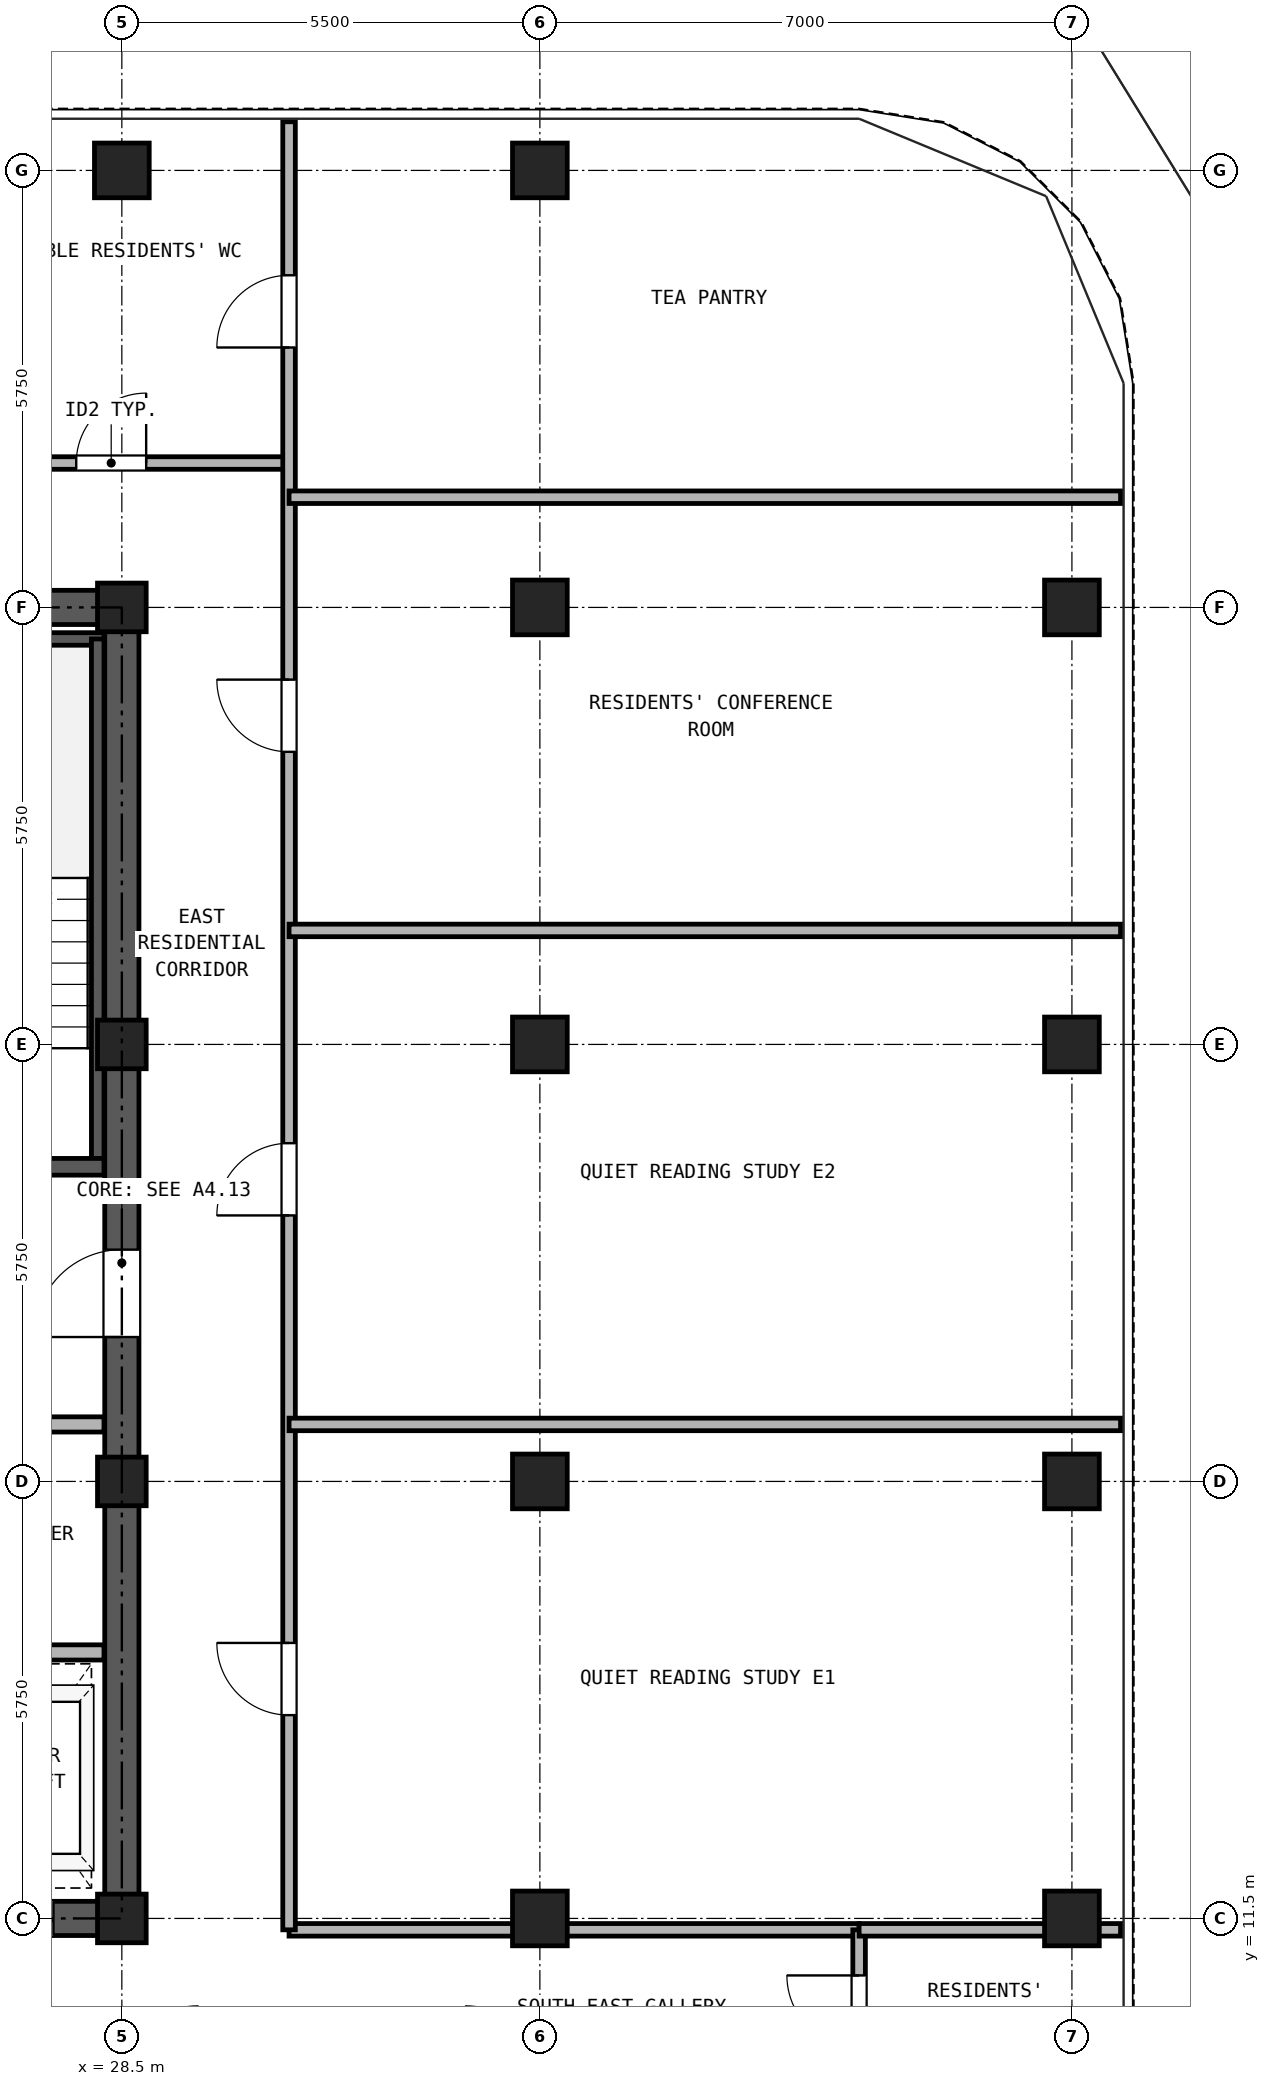
"""IFC4 building model, lengths in metres.
Left out: names, types, materials, properties, quantities, classifications, styles, units other than length and angle.
Written with IfcOpenShell. Run it as: python <this file> out.ifc"""

import sys

from ifc_helpers import new_model, si_unit, direction, frame, frame_2d, origin, origin_2d, place, context, subcontext, project, spatial, rectangle, hollow_rectangle, extrude, source, transform, mapped, element, fill, save


model = new_model("IFC4")
c1 = context("Model", 3, precision=1e-05, world=origin(), true_north=direction((0.0, 1.0)))
c2 = subcontext(c1, "Body", "Model", "MODEL_VIEW")
j1 = project(units=[si_unit("LENGTHUNIT", "METRE"), si_unit("PLANEANGLEUNIT", "RADIAN")], contexts=[c1])
p1 = place(None, origin())
s1 = spatial("IfcSite", under=j1, at=p1, CompositionType="ELEMENT")
p2 = place(p1, origin())
s2 = spatial("IfcBuilding", under=s1, at=p2, CompositionType="ELEMENT")
p3 = place(p2, frame((0.0, 0.0, 206.0)))
s3 = spatial("IfcBuildingStorey", under=s2, at=p3, CompositionType="ELEMENT", Elevation=206.0)
m1 = source(origin(), c2, "Body", "SweptSolid", [
    extrude(hollow_rectangle(XDim=0.72, YDim=0.72, WallThickness=0.04, at=origin_2d()), origin(), (0.0, 0.0, 1.0), 2.95),
])
for number, where, z_axis, x_axis in (
    (1, (28.5, 34.5, 0.0), (0.0, 0.0, 1.0), (1.0, 0.0, 0.0)),
    (2, (34.0, 34.5, 0.0), (0.0, 0.0, 1.0), (1.0, 0.0, 0.0)),
    (3, (41.0, 11.5, 0.0), (0.0, 0.0, 1.0), (1.0, 0.0, 0.0)),
    (4, (41.0, 17.25, 0.0), (0.0, 0.0, 1.0), (1.0, 0.0, 0.0)),
    (5, (41.0, 23.0, 0.0), (0.0, 0.0, 1.0), (1.0, 0.0, 0.0)),
    (6, (41.0, 28.75, 0.0), (0.0, 0.0, 1.0), (1.0, 0.0, 0.0)),
):
    element("IfcColumn", number, at=place(p3, frame(where, z_axis=z_axis, x_axis=x_axis)), inside=s3, PredefinedType="COLUMN", context=c2, shape_type="MappedRepresentation", body=[
        mapped(m1, transform((0.0, 0.0, 0.0), x_axis=(1.0, 0.0, 0.0), y_axis=(0.0, 1.0, 0.0), z_axis=(0.0, 0.0, 1.0), scale=1.0)),
    ])
m2 = source(origin(), c2, "Body", "SweptSolid", [
    extrude(hollow_rectangle(XDim=0.64, YDim=0.64, WallThickness=0.035, at=origin_2d()), origin(), (0.0, 0.0, 1.0), 2.95),
])
for number, where, z_axis, x_axis in (
    (7, (28.5, 11.5, 0.0), (0.0, 0.0, 1.0), (1.0, 0.0, 0.0)),
    (8, (28.5, 17.25, 0.0), (0.0, 0.0, 1.0), (1.0, 0.0, 0.0)),
    (9, (28.5, 23.0, 0.0), (0.0, 0.0, 1.0), (1.0, 0.0, 0.0)),
    (10, (28.5, 28.75, 0.0), (0.0, 0.0, 1.0), (1.0, 0.0, 0.0)),
):
    element("IfcColumn", number, at=place(p3, frame(where, z_axis=z_axis, x_axis=x_axis)), inside=s3, PredefinedType="COLUMN", context=c2, shape_type="MappedRepresentation", body=[
        mapped(m2, transform((0.0, 0.0, 0.0), x_axis=(1.0, 0.0, 0.0), y_axis=(0.0, 1.0, 0.0), z_axis=(0.0, 0.0, 1.0), scale=1.0)),
    ])
for number, where, z_axis, x_axis in (
    (11, (34.0, 11.5, 0.0), (0.0, 0.0, 1.0), (1.0, 0.0, 0.0)),
    (12, (34.0, 17.25, 0.0), (0.0, 0.0, 1.0), (1.0, 0.0, 0.0)),
    (13, (34.0, 23.0, 0.0), (0.0, 0.0, 1.0), (1.0, 0.0, 0.0)),
    (14, (34.0, 28.75, 0.0), (0.0, 0.0, 1.0), (1.0, 0.0, 0.0)),
):
    element("IfcColumn", number, at=place(p3, frame(where, z_axis=z_axis, x_axis=x_axis)), inside=s3, PredefinedType="COLUMN", context=c2, shape_type="MappedRepresentation", body=[
        mapped(m1, transform((0.0, 0.0, 0.0), x_axis=(1.0, 0.0, 0.0), y_axis=(0.0, 1.0, 0.0), z_axis=(0.0, 0.0, 1.0), scale=1.0)),
    ])
p4 = place(p3, frame((18.275, 11.5, 0.0), z_axis=(0.0, 0.0, 1.0), x_axis=(1.0, 0.0, 0.0)))
e15 = element("IfcWall", 15, at=p4, inside=s3, PredefinedType="SHEAR", context=c2, shape_type="SweptSolid", body=[
    extrude(rectangle(XDim=10.45, YDim=0.45, at=frame_2d((5.225, 0.0))), origin(), (0.0, 0.0, 1.0), 2.95),
])
p5 = place(p4, frame((1.825, 0.0, 0.0)))
e16 = element("IfcOpeningElement", 16, at=p5, cuts=e15, PredefinedType="OPENING", context=c2, shape_type="SweptSolid", body=[
    extrude(rectangle(XDim=0.95, YDim=2.15, at=frame_2d((0.475, 1.075))), frame((0.0, 0.235, 0.0), z_axis=(0.0, -1.0, 0.0), x_axis=(1.0, 0.0, 0.0)), (0.0, 0.0, 1.0), 0.47),
])
p6 = place(p4, frame((5.325, 0.0, 0.0)))
e17 = element("IfcOpeningElement", 17, at=p6, cuts=e15, PredefinedType="OPENING", context=c2, shape_type="SweptSolid", body=[
    extrude(rectangle(XDim=0.95, YDim=2.15, at=frame_2d((0.475, 1.075))), frame((0.0, 0.235, 0.0), z_axis=(0.0, -1.0, 0.0), x_axis=(1.0, 0.0, 0.0)), (0.0, 0.0, 1.0), 0.47),
])
p7 = place(p4, frame((8.225, 0.0, 0.0)))
e18 = element("IfcOpeningElement", 18, at=p7, cuts=e15, PredefinedType="OPENING", context=c2, shape_type="SweptSolid", body=[
    extrude(rectangle(XDim=1.1, YDim=2.25, at=frame_2d((0.55, 1.125))), frame((0.0, 0.235, 0.0), z_axis=(0.0, -1.0, 0.0), x_axis=(1.0, 0.0, 0.0)), (0.0, 0.0, 1.0), 0.47),
])
p8 = place(p3, frame((18.275, 28.75, 0.0), z_axis=(0.0, 0.0, 1.0), x_axis=(1.0, 0.0, 0.0)))
e19 = element("IfcWall", 19, at=p8, inside=s3, PredefinedType="SHEAR", context=c2, shape_type="SweptSolid", body=[
    extrude(rectangle(XDim=10.45, YDim=0.45, at=frame_2d((5.225, 0.0))), origin(), (0.0, 0.0, 1.0), 2.95),
])
p9 = place(p8, frame((4.105, 0.0, 0.0)))
e20 = element("IfcOpeningElement", 20, at=p9, cuts=e19, PredefinedType="OPENING", context=c2, shape_type="SweptSolid", body=[
    extrude(rectangle(XDim=0.9, YDim=2.05, at=frame_2d((0.45, 1.025))), frame((0.0, 0.235, 0.0), z_axis=(0.0, -1.0, 0.0), x_axis=(1.0, 0.0, 0.0)), (0.0, 0.0, 1.0), 0.47),
])
p10 = place(p8, frame((5.645, 0.0, 0.0)))
e21 = element("IfcOpeningElement", 21, at=p10, cuts=e19, PredefinedType="OPENING", context=c2, shape_type="SweptSolid", body=[
    extrude(rectangle(XDim=0.9, YDim=2.05, at=frame_2d((0.45, 1.025))), frame((0.0, 0.235, 0.0), z_axis=(0.0, -1.0, 0.0), x_axis=(1.0, 0.0, 0.0)), (0.0, 0.0, 1.0), 0.47),
])
p11 = place(p3, frame((28.5, 11.725, 0.0), z_axis=(0.0, 0.0, 1.0), x_axis=(0.0, 1.0, 0.0)))
e22 = element("IfcWall", 22, at=p11, inside=s3, PredefinedType="SHEAR", context=c2, shape_type="SweptSolid", body=[
    extrude(rectangle(XDim=16.8, YDim=0.45, at=frame_2d((8.4, 0.0))), origin(), (0.0, 0.0, 1.0), 2.95),
])
p12 = place(p11, frame((7.425, 0.0, 0.0)))
e23 = element("IfcOpeningElement", 23, at=p12, cuts=e22, PredefinedType="OPENING", context=c2, shape_type="SweptSolid", body=[
    extrude(rectangle(XDim=1.15, YDim=2.2, at=frame_2d((0.575, 1.1))), frame((0.0, 0.235, 0.0), z_axis=(0.0, -1.0, 0.0), x_axis=(1.0, 0.0, 0.0)), (0.0, 0.0, 1.0), 0.47),
])
p13 = place(p3, frame((25.13, 28.335, 0.0), z_axis=(0.0, 0.0, 1.0), x_axis=(1.0, 0.0, 0.0)))
e24 = element("IfcWall", 24, at=p13, inside=s3, PredefinedType="PARTITIONING", context=c2, shape_type="SweptSolid", body=[
    extrude(rectangle(XDim=3.135, YDim=0.165, at=frame_2d((1.567, 0.0))), origin(), (0.0, 0.0, 1.0), 2.95),
])
p14 = place(p3, frame((28.183, 21.39, 0.0), z_axis=(0.0, 0.0, 1.0), x_axis=(0.0, 1.0, 0.0)))
e25 = element("IfcWall", 25, at=p14, inside=s3, PredefinedType="PARTITIONING", context=c2, shape_type="SweptSolid", body=[
    extrude(rectangle(XDim=6.945, YDim=0.165, at=frame_2d((3.473, 0.0))), origin(), (0.0, 0.0, 1.0), 2.95),
])
p15 = place(p3, frame((25.13, 21.39, 0.0), z_axis=(0.0, 0.0, 1.0), x_axis=(1.0, 0.0, 0.0)))
e26 = element("IfcWall", 26, at=p15, inside=s3, PredefinedType="SOLIDWALL", context=c2, shape_type="SweptSolid", body=[
    extrude(rectangle(XDim=3.135, YDim=0.22, at=frame_2d((1.567, 0.0))), origin(), (0.0, 0.0, 1.0), 2.95),
])
p16 = place(p15, frame((0.92, 0.0, 0.0)))
e27 = element("IfcOpeningElement", 27, at=p16, cuts=e26, PredefinedType="OPENING", context=c2, shape_type="SweptSolid", body=[
    extrude(rectangle(XDim=1.15, YDim=2.2, at=frame_2d((0.575, 1.1))), frame((0.0, 0.12, 0.0), z_axis=(0.0, -1.0, 0.0), x_axis=(1.0, 0.0, 0.0)), (0.0, 0.0, 1.0), 0.24),
])
p17 = place(p3, frame((18.735, 18.0, 0.0), z_axis=(0.0, 0.0, 1.0), x_axis=(1.0, 0.0, 0.0)))
e28 = element("IfcWall", 28, at=p17, inside=s3, PredefinedType="PARTITIONING", context=c2, shape_type="SweptSolid", body=[
    extrude(rectangle(XDim=9.53, YDim=0.2, at=frame_2d((4.765, 0.0))), origin(), (0.0, 0.0, 1.0), 2.95),
])
p18 = place(p17, frame((0.515, 0.0, 0.0)))
e29 = element("IfcOpeningElement", 29, at=p18, cuts=e28, PredefinedType="OPENING", context=c2, shape_type="SweptSolid", body=[
    extrude(rectangle(XDim=1.3, YDim=2.3, at=frame_2d((0.65, 1.15))), frame((0.0, 0.11, 0.0), z_axis=(0.0, -1.0, 0.0), x_axis=(1.0, 0.0, 0.0)), (0.0, 0.0, 1.0), 0.22),
])
p19 = place(p17, frame((2.615, 0.0, 0.0)))
e30 = element("IfcOpeningElement", 30, at=p19, cuts=e28, PredefinedType="OPENING", context=c2, shape_type="SweptSolid", body=[
    extrude(rectangle(XDim=1.3, YDim=2.3, at=frame_2d((0.65, 1.15))), frame((0.0, 0.11, 0.0), z_axis=(0.0, -1.0, 0.0), x_axis=(1.0, 0.0, 0.0)), (0.0, 0.0, 1.0), 0.22),
])
p20 = place(p17, frame((5.015, 0.0, 0.0)))
e31 = element("IfcOpeningElement", 31, at=p20, cuts=e28, PredefinedType="OPENING", context=c2, shape_type="SweptSolid", body=[
    extrude(rectangle(XDim=0.9, YDim=2.05, at=frame_2d((0.45, 1.025))), frame((0.0, 0.11, 0.0), z_axis=(0.0, -1.0, 0.0), x_axis=(1.0, 0.0, 0.0)), (0.0, 0.0, 1.0), 0.22),
])
p21 = place(p17, frame((7.715, 0.0, 0.0)))
e32 = element("IfcOpeningElement", 32, at=p21, cuts=e28, PredefinedType="OPENING", context=c2, shape_type="SweptSolid", body=[
    extrude(rectangle(XDim=0.9, YDim=2.05, at=frame_2d((0.45, 1.025))), frame((0.0, 0.11, 0.0), z_axis=(0.0, -1.0, 0.0), x_axis=(1.0, 0.0, 0.0)), (0.0, 0.0, 1.0), 0.22),
])
p22 = place(p3, frame((18.735, 15.0, 0.0), z_axis=(0.0, 0.0, 1.0), x_axis=(1.0, 0.0, 0.0)))
e33 = element("IfcWall", 33, at=p22, inside=s3, PredefinedType="PARTITIONING", context=c2, shape_type="SweptSolid", body=[
    extrude(rectangle(XDim=9.53, YDim=0.2, at=frame_2d((4.765, 0.0))), origin(), (0.0, 0.0, 1.0), 2.95),
])
p23 = place(p3, frame((30.7, 11.35, 0.0), z_axis=(0.0, 0.0, 1.0), x_axis=(1.0, 0.0, 0.0)))
e34 = element("IfcWall", 34, at=p23, inside=s3, PredefinedType="PARTITIONING", context=c2, shape_type="SweptSolid", body=[
    extrude(rectangle(XDim=7.5, YDim=0.165, at=frame_2d((3.75, 0.0))), origin(), (0.0, 0.0, 1.0), 2.323),
])
p24 = place(p3, frame((38.2, 9.35, 0.0), z_axis=(0.0, 0.0, 1.0), x_axis=(0.0, 1.0, 0.0)))
e35 = element("IfcWall", 35, at=p24, inside=s3, PredefinedType="PARTITIONING", context=c2, shape_type="SweptSolid", body=[
    extrude(rectangle(XDim=2.0, YDim=0.165, at=frame_2d((1.0, 0.0))), origin(), (0.0, 0.0, 1.0), 2.95),
])
p25 = place(p24, frame((0.45, 0.0, 0.0)))
e36 = element("IfcOpeningElement", 36, at=p25, cuts=e35, PredefinedType="OPENING", context=c2, shape_type="SweptSolid", body=[
    extrude(rectangle(XDim=0.95, YDim=2.15, at=frame_2d((0.475, 1.075))), frame((0.0, 0.093, 0.0), z_axis=(0.0, -1.0, 0.0), x_axis=(1.0, 0.0, 0.0)), (0.0, 0.0, 1.0), 0.185),
])
p26 = place(p3, frame((16.3, 30.65, 0.0), z_axis=(0.0, 0.0, 1.0), x_axis=(1.0, 0.0, 0.0)))
e37 = element("IfcWall", 37, at=p26, inside=s3, PredefinedType="PARTITIONING", context=c2, shape_type="SweptSolid", body=[
    extrude(rectangle(XDim=14.4, YDim=0.165, at=frame_2d((7.2, 0.0))), origin(), (0.0, 0.0, 1.0), 2.95),
])
p27 = place(p26, frame((3.1, 0.0, 0.0)))
e38 = element("IfcOpeningElement", 38, at=p27, cuts=e37, PredefinedType="OPENING", context=c2, shape_type="SweptSolid", body=[
    extrude(rectangle(XDim=0.95, YDim=2.15, at=frame_2d((0.475, 1.075))), frame((0.0, 0.093, 0.0), z_axis=(0.0, -1.0, 0.0), x_axis=(1.0, 0.0, 0.0)), (0.0, 0.0, 1.0), 0.185),
])
p28 = place(p26, frame((8.0, 0.0, 0.0)))
e39 = element("IfcOpeningElement", 39, at=p28, cuts=e37, PredefinedType="OPENING", context=c2, shape_type="SweptSolid", body=[
    extrude(rectangle(XDim=0.95, YDim=2.15, at=frame_2d((0.475, 1.075))), frame((0.0, 0.093, 0.0), z_axis=(0.0, -1.0, 0.0), x_axis=(1.0, 0.0, 0.0)), (0.0, 0.0, 1.0), 0.185),
])
p29 = place(p26, frame((11.6, 0.0, 0.0)))
e40 = element("IfcOpeningElement", 40, at=p29, cuts=e37, PredefinedType="OPENING", context=c2, shape_type="SweptSolid", body=[
    extrude(rectangle(XDim=0.92, YDim=2.1, at=frame_2d((0.46, 1.05))), frame((0.0, 0.093, 0.0), z_axis=(0.0, -1.0, 0.0), x_axis=(1.0, 0.0, 0.0)), (0.0, 0.0, 1.0), 0.185),
])
p30 = place(p3, frame((30.7, 11.35, 0.0), z_axis=(0.0, 0.0, 1.0), x_axis=(0.0, 1.0, 0.0)))
e41 = element("IfcWall", 41, at=p30, inside=s3, PredefinedType="PARTITIONING", context=c2, shape_type="SweptSolid", body=[
    extrude(rectangle(XDim=23.79, YDim=0.165, at=frame_2d((11.895, 0.0))), origin(), (0.0, 0.0, 1.0), 2.95),
])
p31 = place(p30, frame((2.825, 0.0, 0.0)))
e42 = element("IfcOpeningElement", 42, at=p31, cuts=e41, PredefinedType="OPENING", context=c2, shape_type="SweptSolid", body=[
    extrude(rectangle(XDim=0.95, YDim=2.15, at=frame_2d((0.475, 1.075))), frame((0.0, 0.093, 0.0), z_axis=(0.0, -1.0, 0.0), x_axis=(1.0, 0.0, 0.0)), (0.0, 0.0, 1.0), 0.185),
])
p32 = place(p30, frame((9.4, 0.0, 0.0)))
e43 = element("IfcOpeningElement", 43, at=p32, cuts=e41, PredefinedType="OPENING", context=c2, shape_type="SweptSolid", body=[
    extrude(rectangle(XDim=0.95, YDim=2.15, at=frame_2d((0.475, 1.075))), frame((0.0, 0.093, 0.0), z_axis=(0.0, -1.0, 0.0), x_axis=(1.0, 0.0, 0.0)), (0.0, 0.0, 1.0), 0.185),
])
p33 = place(p30, frame((15.5, 0.0, 0.0)))
e44 = element("IfcOpeningElement", 44, at=p33, cuts=e41, PredefinedType="OPENING", context=c2, shape_type="SweptSolid", body=[
    extrude(rectangle(XDim=0.95, YDim=2.15, at=frame_2d((0.475, 1.075))), frame((0.0, 0.093, 0.0), z_axis=(0.0, -1.0, 0.0), x_axis=(1.0, 0.0, 0.0)), (0.0, 0.0, 1.0), 0.185),
])
p34 = place(p30, frame((20.82, 0.0, 0.0)))
e45 = element("IfcOpeningElement", 45, at=p34, cuts=e41, PredefinedType="OPENING", context=c2, shape_type="SweptSolid", body=[
    extrude(rectangle(XDim=0.95, YDim=2.15, at=frame_2d((0.475, 1.075))), frame((0.0, 0.093, 0.0), z_axis=(0.0, -1.0, 0.0), x_axis=(1.0, 0.0, 0.0)), (0.0, 0.0, 1.0), 0.185),
])
p35 = place(p3, frame((38.2, 11.35, 0.0), z_axis=(0.0, 0.0, 1.0), x_axis=(1.0, 0.0, 0.0)))
e46 = element("IfcWall", 46, at=p35, inside=s3, PredefinedType="PARTITIONING", context=c2, shape_type="SweptSolid", body=[
    extrude(rectangle(XDim=3.44, YDim=0.165, at=frame_2d((1.72, 0.0))), origin(), (0.0, 0.0, 1.0), 2.323),
])
for number, where, z_axis, x_axis in (
    (47, (30.7, 18.0, 0.0), (0.0, 0.0, 1.0), (1.0, 0.0, 0.0)),
    (48, (30.7, 24.5, 0.0), (0.0, 0.0, 1.0), (1.0, 0.0, 0.0)),
    (49, (30.7, 30.2, 0.0), (0.0, 0.0, 1.0), (1.0, 0.0, 0.0)),
):
    element("IfcWall", number, at=place(p3, frame(where, z_axis=z_axis, x_axis=x_axis)), inside=s3, PredefinedType="PARTITIONING", context=c2, shape_type="SweptSolid", body=[
        extrude(rectangle(XDim=10.94, YDim=0.165, at=frame_2d((5.47, 0.0))), origin(), (0.0, 0.0, 1.0), 2.95),
    ])
p36 = place(p12, origin())
e50 = element("IfcDoor", 50, at=p36, inside=s3, OperationType="SINGLE_SWING_LEFT", PredefinedType="DOOR", context=c2, shape_type="SweptSolid", body=[
    extrude(rectangle(XDim=1.15, YDim=2.2, at=frame_2d((0.575, 1.1))), frame((0.0, 0.025, 0.0), z_axis=(0.0, -1.0, 0.0), x_axis=(1.0, 0.0, 0.0)), (0.0, 0.0, 1.0), 0.05),
])
fill(e23, e50)
p37 = place(p7, frame((1.1, 0.0, 0.0), z_axis=(0.0, 0.0, 1.0), x_axis=(-1.0, 0.0, 0.0)))
e51 = element("IfcDoor", 51, at=p37, inside=s3, OperationType="DOUBLE_DOOR_SLIDING", PredefinedType="DOOR", context=c2, shape_type="SweptSolid", body=[
    extrude(rectangle(XDim=1.1, YDim=2.25, at=frame_2d((0.55, 1.125))), frame((0.0, 0.025, 0.0), z_axis=(0.0, -1.0, 0.0), x_axis=(1.0, 0.0, 0.0)), (0.0, 0.0, 1.0), 0.05),
])
fill(e18, e51)
p38 = place(p25, origin())
e52 = element("IfcDoor", 52, at=p38, inside=s3, OperationType="SINGLE_SWING_RIGHT", PredefinedType="DOOR", context=c2, shape_type="SweptSolid", body=[
    extrude(rectangle(XDim=0.95, YDim=2.15, at=frame_2d((0.475, 1.075))), frame((0.0, 0.025, 0.0), z_axis=(0.0, -1.0, 0.0), x_axis=(1.0, 0.0, 0.0)), (0.0, 0.0, 1.0), 0.05),
])
fill(e36, e52)
p39 = place(p31, origin())
e53 = element("IfcDoor", 53, at=p39, inside=s3, OperationType="SINGLE_SWING_RIGHT", PredefinedType="DOOR", context=c2, shape_type="SweptSolid", body=[
    extrude(rectangle(XDim=0.95, YDim=2.15, at=frame_2d((0.475, 1.075))), frame((0.0, 0.025, 0.0), z_axis=(0.0, -1.0, 0.0), x_axis=(1.0, 0.0, 0.0)), (0.0, 0.0, 1.0), 0.05),
])
fill(e42, e53)
p40 = place(p32, origin())
e54 = element("IfcDoor", 54, at=p40, inside=s3, OperationType="SINGLE_SWING_LEFT", PredefinedType="DOOR", context=c2, shape_type="SweptSolid", body=[
    extrude(rectangle(XDim=0.95, YDim=2.15, at=frame_2d((0.475, 1.075))), frame((0.0, 0.025, 0.0), z_axis=(0.0, -1.0, 0.0), x_axis=(1.0, 0.0, 0.0)), (0.0, 0.0, 1.0), 0.05),
])
fill(e43, e54)
p41 = place(p33, origin())
e55 = element("IfcDoor", 55, at=p41, inside=s3, OperationType="SINGLE_SWING_RIGHT", PredefinedType="DOOR", context=c2, shape_type="SweptSolid", body=[
    extrude(rectangle(XDim=0.95, YDim=2.15, at=frame_2d((0.475, 1.075))), frame((0.0, 0.025, 0.0), z_axis=(0.0, -1.0, 0.0), x_axis=(1.0, 0.0, 0.0)), (0.0, 0.0, 1.0), 0.05),
])
fill(e44, e55)
p42 = place(p34, origin())
e56 = element("IfcDoor", 56, at=p42, inside=s3, OperationType="SINGLE_SWING_LEFT", PredefinedType="DOOR", context=c2, shape_type="SweptSolid", body=[
    extrude(rectangle(XDim=0.95, YDim=2.15, at=frame_2d((0.475, 1.075))), frame((0.0, 0.025, 0.0), z_axis=(0.0, -1.0, 0.0), x_axis=(1.0, 0.0, 0.0)), (0.0, 0.0, 1.0), 0.05),
])
fill(e45, e56)
p43 = place(p29, origin())
e57 = element("IfcDoor", 57, at=p43, inside=s3, OperationType="SINGLE_SWING_RIGHT", PredefinedType="DOOR", context=c2, shape_type="SweptSolid", body=[
    extrude(rectangle(XDim=0.92, YDim=2.1, at=frame_2d((0.46, 1.05))), frame((0.0, 0.025, 0.0), z_axis=(0.0, -1.0, 0.0), x_axis=(1.0, 0.0, 0.0)), (0.0, 0.0, 1.0), 0.05),
])
fill(e40, e57)
save(model, sys.argv[1])
